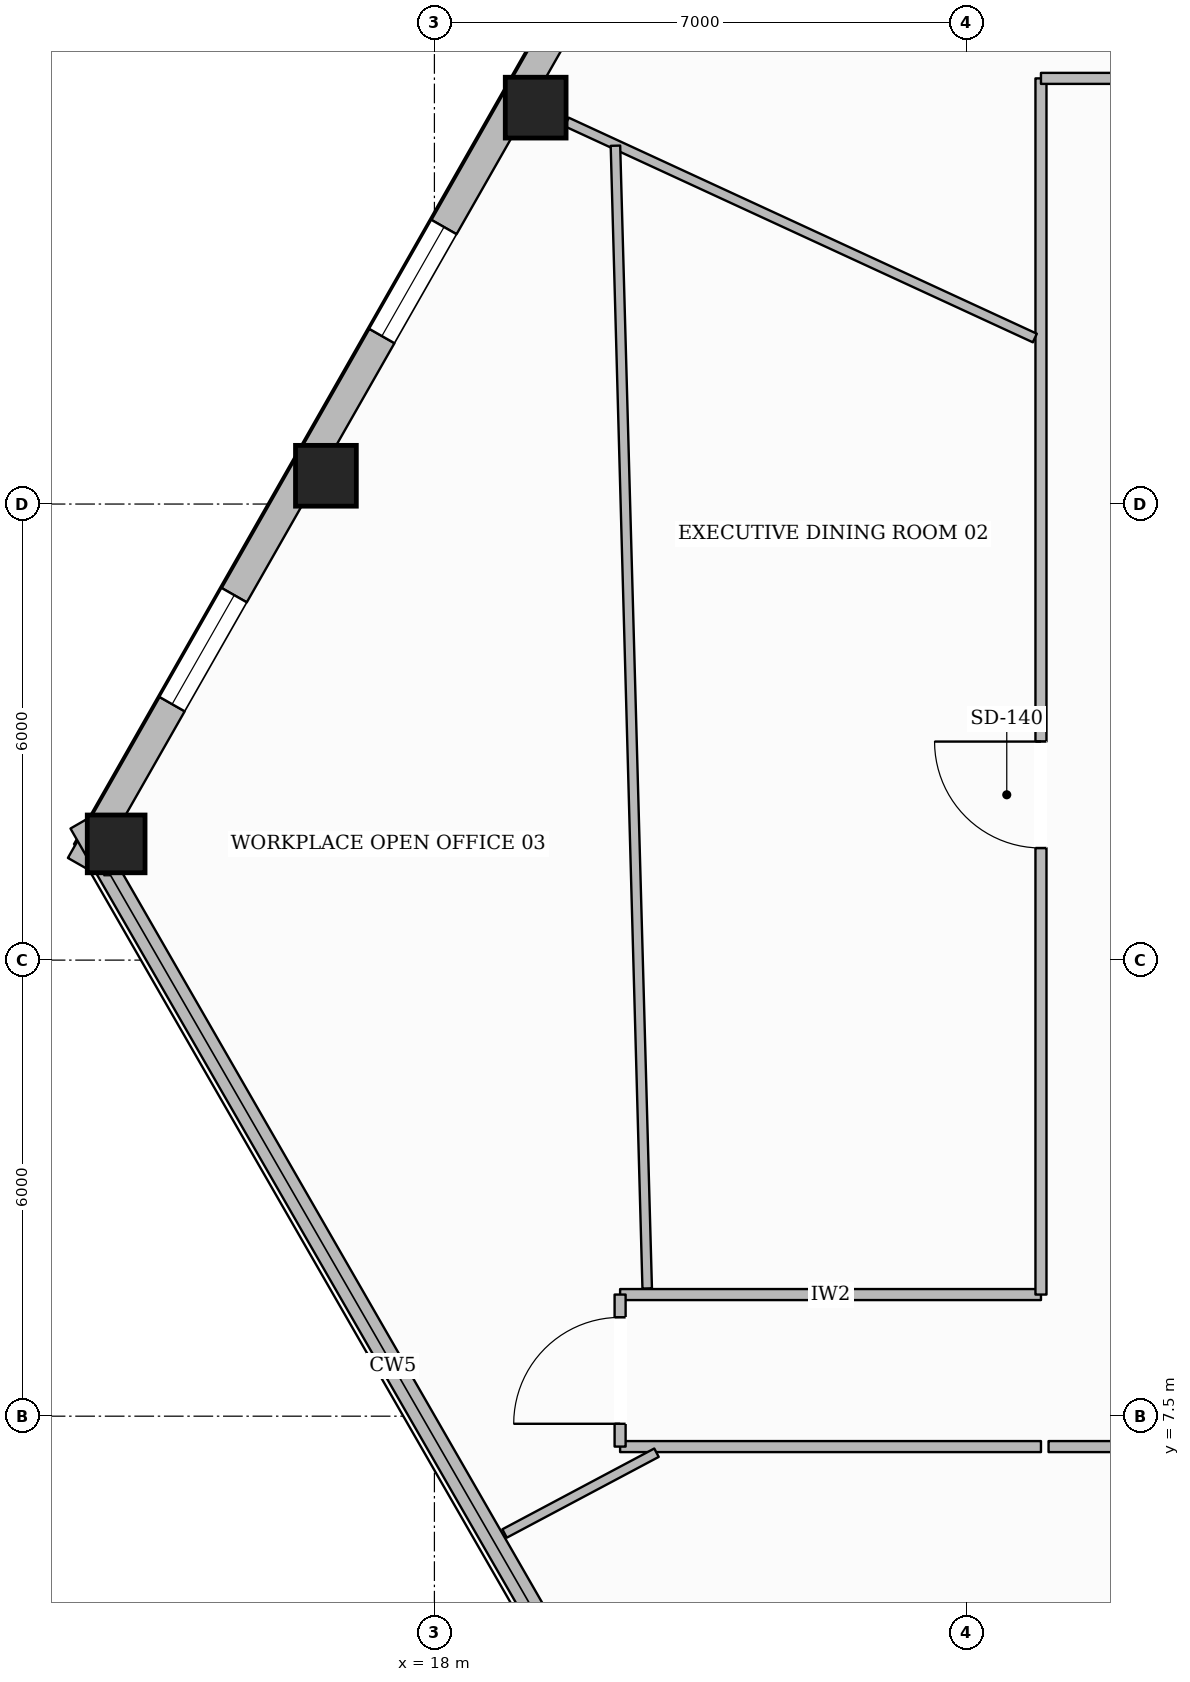
"""IFC4 building model, lengths in metres.
Left out: names, types, materials, properties, quantities, classifications, styles, units other than length and angle.
Written with IfcOpenShell. Run it as: python <this file> out.ifc"""

import sys

from ifc_helpers import new_model, si_unit, direction, frame, frame_2d, origin, origin_2d, place, context, subcontext, project, spatial, rectangle, hollow_rectangle, extrude, element, fill, save


model = new_model("IFC4")
c1 = context("Model", 3, precision=1e-05, world=origin(), true_north=direction((0.0, 1.0)))
c2 = subcontext(c1, "Body", "Model", "MODEL_VIEW")
j1 = project(units=[si_unit("LENGTHUNIT", "METRE"), si_unit("PLANEANGLEUNIT", "RADIAN")], contexts=[c1])
p1 = place(None, origin())
s1 = spatial("IfcSite", under=j1, at=p1, CompositionType="ELEMENT")
p2 = place(p1, origin())
s2 = spatial("IfcBuilding", under=s1, at=p2, CompositionType="ELEMENT")
p3 = place(p2, frame((0.0, 0.0, 36.8)))
s3 = spatial("IfcBuildingStorey", under=s2, at=p3, CompositionType="ELEMENT", Elevation=36.8)
for number, where, z_axis, x_axis in (
    (1, (19.332, 24.715, 0.0), (0.0, 0.0, 1.0), (1.0, 0.0, 0.0)),
    (2, (16.573, 19.872, 0.0), (0.0, 0.0, 1.0), (1.0, 0.0, 0.0)),
):
    element("IfcColumn", number, at=place(p3, frame(where, z_axis=z_axis, x_axis=x_axis)), inside=s3, PredefinedType="COLUMN", context=c2, shape_type="SweptSolid", body=[
        extrude(hollow_rectangle(XDim=0.8, YDim=0.8, WallThickness=0.036, at=origin_2d()), origin(), (0.0, 0.0, 1.0), 3.59),
    ])
p4 = place(p3, frame((13.813, 15.029, 0.0), z_axis=(0.0, 0.0, 1.0), x_axis=(1.0, 0.0, 0.0)))
e3 = element("IfcColumn", 3, at=p4, inside=s3, PredefinedType="COLUMN", context=c2, shape_type="SweptSolid", body=[
    extrude(hollow_rectangle(XDim=0.76, YDim=0.76, WallThickness=0.035, at=origin_2d()), origin(), (0.0, 0.0, 1.0), 3.59),
])
p5 = place(p3, frame((13.343, 14.75, 0.0), z_axis=(0.0, 0.0, 1.0), x_axis=(0.495088404126, 0.868842604906, 0.0)))
e4 = element("IfcWall", 4, at=p5, inside=s3, PredefinedType="STANDARD", context=c2, shape_type="SweptSolid", body=[
    extrude(rectangle(XDim=34.399, YDim=0.38, at=frame_2d((17.2, 0.0))), origin(), (0.0, 0.0, 1.0), 2.97),
])
p6 = place(p5, frame((30.307, 0.0, 0.65)))
e5 = element("IfcOpeningElement", 5, at=p6, cuts=e4, PredefinedType="OPENING", context=c2, shape_type="SweptSolid", body=[
    extrude(rectangle(XDim=1.65, YDim=1.75, at=frame_2d((0.825, 0.875))), frame((0.0, 0.2, 0.0), z_axis=(0.0, -1.0, 0.0), x_axis=(1.0, 0.0, 0.0)), (0.0, 0.0, 1.0), 0.4),
])
p7 = place(p5, frame((24.733, 0.0, 0.65)))
e6 = element("IfcOpeningElement", 6, at=p7, cuts=e4, PredefinedType="OPENING", context=c2, shape_type="SweptSolid", body=[
    extrude(rectangle(XDim=1.65, YDim=1.75, at=frame_2d((0.825, 0.875))), frame((0.0, 0.2, 0.0), z_axis=(0.0, -1.0, 0.0), x_axis=(1.0, 0.0, 0.0)), (0.0, 0.0, 1.0), 0.4),
])
p8 = place(p5, frame((13.585, 0.0, 0.65)))
e7 = element("IfcOpeningElement", 7, at=p8, cuts=e4, PredefinedType="OPENING", context=c2, shape_type="SweptSolid", body=[
    extrude(rectangle(XDim=1.65, YDim=1.75, at=frame_2d((0.825, 0.875))), frame((0.0, 0.2, 0.0), z_axis=(0.0, -1.0, 0.0), x_axis=(1.0, 0.0, 0.0)), (0.0, 0.0, 1.0), 0.4),
])
p9 = place(p5, frame((8.011, 0.0, 0.65)))
e8 = element("IfcOpeningElement", 8, at=p9, cuts=e4, PredefinedType="OPENING", context=c2, shape_type="SweptSolid", body=[
    extrude(rectangle(XDim=1.65, YDim=1.75, at=frame_2d((0.825, 0.875))), frame((0.0, 0.2, 0.0), z_axis=(0.0, -1.0, 0.0), x_axis=(1.0, 0.0, 0.0)), (0.0, 0.0, 1.0), 0.4),
])
p10 = place(p5, frame((2.437, 0.0, 0.65)))
e9 = element("IfcOpeningElement", 9, at=p10, cuts=e4, PredefinedType="OPENING", context=c2, shape_type="SweptSolid", body=[
    extrude(rectangle(XDim=1.65, YDim=1.75, at=frame_2d((0.825, 0.875))), frame((0.0, 0.2, 0.0), z_axis=(0.0, -1.0, 0.0), x_axis=(1.0, 0.0, 0.0)), (0.0, 0.0, 1.0), 0.4),
])
p11 = place(p3, frame((21.564, 1.016, 0.0), z_axis=(0.0, 0.0, 1.0), x_axis=(-0.49869007713, 0.866780368359, 0.0)))
e10 = element("IfcWall", 10, at=p11, inside=s3, PredefinedType="STANDARD", context=c2, shape_type="SweptSolid", body=[
    extrude(rectangle(XDim=16.486, YDim=0.3, at=frame_2d((8.243, 0.0))), origin(), (0.0, 0.0, 1.0), 2.97),
])
p12 = place(p3, frame((20.443, 9.1, 0.0), z_axis=(0.0, 0.0, 1.0), x_axis=(1.0, 0.0, 0.0)))
e11 = element("IfcWall", 11, at=p12, inside=s3, PredefinedType="PARTITIONING", context=c2, shape_type="SweptSolid", body=[
    extrude(rectangle(XDim=5.537, YDim=0.145, at=frame_2d((2.769, 0.0))), origin(), (0.0, 0.0, 1.0), 3.59),
])
p13 = place(p3, frame((25.98, 9.1, 0.0), z_axis=(0.0, 0.0, 1.0), x_axis=(0.0, 1.0, 0.0)))
e12 = element("IfcWall", 12, at=p13, inside=s3, PredefinedType="PARTITIONING", context=c2, shape_type="SweptSolid", body=[
    extrude(rectangle(XDim=16.0, YDim=0.145, at=frame_2d((8.0, 0.0))), origin(), (0.0, 0.0, 1.0), 3.278),
])
p14 = place(p13, frame((5.875, 0.0, 0.0)))
e13 = element("IfcOpeningElement", 13, at=p14, cuts=e12, PredefinedType="OPENING", context=c2, shape_type="SweptSolid", body=[
    extrude(rectangle(XDim=1.4, YDim=2.2, at=frame_2d((0.7, 1.1))), frame((0.0, 0.083, 0.0), z_axis=(0.0, -1.0, 0.0), x_axis=(1.0, 0.0, 0.0)), (0.0, 0.0, 1.0), 0.165),
])
p15 = place(p3, frame((25.98, 25.1, 0.0), z_axis=(0.0, 0.0, 1.0), x_axis=(1.0, 0.0, 0.0)))
e14 = element("IfcWall", 14, at=p15, inside=s3, PredefinedType="PARTITIONING", context=c2, shape_type="SweptSolid", body=[
    extrude(rectangle(XDim=11.02, YDim=0.145, at=frame_2d((5.51, 0.0))), origin(), (0.0, 0.0, 1.0), 3.59),
])
p16 = place(p15, frame((3.38, 0.0, 0.0)))
e15 = element("IfcOpeningElement", 15, at=p16, cuts=e14, PredefinedType="OPENING", context=c2, shape_type="SweptSolid", body=[
    extrude(rectangle(XDim=0.88, YDim=2.1, at=frame_2d((0.44, 1.05))), frame((0.0, 0.083, 0.0), z_axis=(0.0, -1.0, 0.0), x_axis=(1.0, 0.0, 0.0)), (0.0, 0.0, 1.0), 0.165),
])
p17 = place(p15, frame((5.9, 0.0, 0.0)))
e16 = element("IfcOpeningElement", 16, at=p17, cuts=e14, PredefinedType="OPENING", context=c2, shape_type="SweptSolid", body=[
    extrude(rectangle(XDim=0.88, YDim=2.1, at=frame_2d((0.44, 1.05))), frame((0.0, 0.083, 0.0), z_axis=(0.0, -1.0, 0.0), x_axis=(1.0, 0.0, 0.0)), (0.0, 0.0, 1.0), 0.165),
])
p18 = place(p15, frame((8.28, 0.0, 0.0)))
e17 = element("IfcOpeningElement", 17, at=p18, cuts=e14, PredefinedType="OPENING", context=c2, shape_type="SweptSolid", body=[
    extrude(rectangle(XDim=0.96, YDim=2.1, at=frame_2d((0.48, 1.05))), frame((0.0, 0.083, 0.0), z_axis=(0.0, -1.0, 0.0), x_axis=(1.0, 0.0, 0.0)), (0.0, 0.0, 1.0), 0.165),
])
p19 = place(p3, frame((49.92, 7.1, 0.0), z_axis=(0.0, 0.0, 1.0), x_axis=(-1.0, 0.0, 0.0)))
e18 = element("IfcWall", 18, at=p19, inside=s3, PredefinedType="PARTITIONING", context=c2, shape_type="SweptSolid", body=[
    extrude(rectangle(XDim=23.84, YDim=0.145, at=frame_2d((11.92, 0.0))), origin(), (0.0, 0.0, 1.0), 3.278),
])
p20 = place(p19, frame((12.102, 0.0, 0.0)))
e19 = element("IfcOpeningElement", 19, at=p20, cuts=e18, PredefinedType="OPENING", context=c2, shape_type="SweptSolid", body=[
    extrude(rectangle(XDim=1.02, YDim=2.15, at=frame_2d((0.51, 1.075))), frame((0.0, 0.083, 0.0), z_axis=(0.0, -1.0, 0.0), x_axis=(1.0, 0.0, 0.0)), (0.0, 0.0, 1.0), 0.165),
])
p21 = place(p3, frame((25.98, 7.1, 0.0), z_axis=(0.0, 0.0, 1.0), x_axis=(-1.0, 0.0, 0.0)))
e20 = element("IfcWall", 20, at=p21, inside=s3, PredefinedType="PARTITIONING", context=c2, shape_type="SweptSolid", body=[
    extrude(rectangle(XDim=5.537, YDim=0.145, at=frame_2d((2.769, 0.0))), origin(), (0.0, 0.0, 1.0), 3.59),
])
p22 = place(p3, frame((20.443, 7.1, 0.0), z_axis=(0.0, 0.0, 1.0), x_axis=(0.0, 1.0, 0.0)))
e21 = element("IfcWall", 21, at=p22, inside=s3, PredefinedType="PARTITIONING", context=c2, shape_type="SweptSolid", body=[
    extrude(rectangle(XDim=2.0, YDim=0.145, at=frame_2d((1.0, 0.0))), origin(), (0.0, 0.0, 1.0), 3.59),
])
p23 = place(p22, frame((0.3, 0.0, 0.0)))
e22 = element("IfcOpeningElement", 22, at=p23, cuts=e21, PredefinedType="OPENING", context=c2, shape_type="SweptSolid", body=[
    extrude(rectangle(XDim=1.4, YDim=2.2, at=frame_2d((0.7, 1.1))), frame((0.0, 0.083, 0.0), z_axis=(0.0, -1.0, 0.0), x_axis=(1.0, 0.0, 0.0)), (0.0, 0.0, 1.0), 0.165),
])
p24 = place(p3, frame((25.899, 21.684, 0.0), z_axis=(0.0, 0.0, 1.0), x_axis=(-0.907982557846, 0.419007964898, 0.0)))
e23 = element("IfcWall", 23, at=p24, inside=s3, PredefinedType="PARTITIONING", context=c2, shape_type="SweptSolid", body=[
    extrude(rectangle(XDim=6.783, YDim=0.125, at=frame_2d((3.392, 0.0))), origin(), (0.0, 0.0, 1.0), 3.057),
])
p25 = place(p3, frame((20.922, 7.02, 0.0), z_axis=(0.0, 0.0, 1.0), x_axis=(-0.882952292077, -0.469462724736, 0.0)))
e24 = element("IfcWall", 24, at=p25, inside=s3, PredefinedType="PARTITIONING", context=c2, shape_type="SweptSolid", body=[
    extrude(rectangle(XDim=2.264, YDim=0.125, at=frame_2d((1.132, 0.0))), origin(), (0.0, 0.0, 1.0), 3.59),
])
p26 = place(p3, frame((20.382, 24.214, 0.0), z_axis=(0.0, 0.0, 1.0), x_axis=(0.027791398398, -0.999613744491, 0.0)))
e25 = element("IfcWall", 25, at=p26, inside=s3, PredefinedType="PARTITIONING", context=c2, shape_type="SweptSolid", body=[
    extrude(rectangle(XDim=15.04, YDim=0.125, at=frame_2d((7.52, 0.0))), origin(), (0.0, 0.0, 1.0), 3.278),
])
p27 = place(p9, origin())
e26 = element("IfcWindow", 26, at=p27, inside=s3, PartitioningType="SINGLE_PANEL", PredefinedType="WINDOW", context=c2, shape_type="SweptSolid", body=[
    extrude(rectangle(XDim=1.65, YDim=1.75, at=frame_2d((0.825, 0.875))), frame((0.0, 0.03, 0.0), z_axis=(0.0, -1.0, 0.0), x_axis=(1.0, 0.0, 0.0)), (0.0, 0.0, 1.0), 0.06),
])
fill(e8, e26)
p28 = place(p10, origin())
e27 = element("IfcWindow", 27, at=p28, inside=s3, PartitioningType="SINGLE_PANEL", PredefinedType="WINDOW", context=c2, shape_type="SweptSolid", body=[
    extrude(rectangle(XDim=1.65, YDim=1.75, at=frame_2d((0.825, 0.875))), frame((0.0, 0.03, 0.0), z_axis=(0.0, -1.0, 0.0), x_axis=(1.0, 0.0, 0.0)), (0.0, 0.0, 1.0), 0.06),
])
fill(e9, e27)
p29 = place(p14, origin())
e28 = element("IfcDoor", 28, at=p29, inside=s3, OperationType="SINGLE_SWING_RIGHT", PredefinedType="DOOR", context=c2, shape_type="SweptSolid", body=[
    extrude(rectangle(XDim=1.4, YDim=2.2, at=frame_2d((0.7, 1.1))), frame((0.0, 0.025, 0.0), z_axis=(0.0, -1.0, 0.0), x_axis=(1.0, 0.0, 0.0)), (0.0, 0.0, 1.0), 0.05),
])
fill(e13, e28)
p30 = place(p23, origin())
e29 = element("IfcDoor", 29, at=p30, inside=s3, OperationType="SINGLE_SWING_LEFT", PredefinedType="DOOR", context=c2, shape_type="SweptSolid", body=[
    extrude(rectangle(XDim=1.4, YDim=2.2, at=frame_2d((0.7, 1.1))), frame((0.0, 0.025, 0.0), z_axis=(0.0, -1.0, 0.0), x_axis=(1.0, 0.0, 0.0)), (0.0, 0.0, 1.0), 0.05),
])
fill(e22, e29)
save(model, sys.argv[1])
